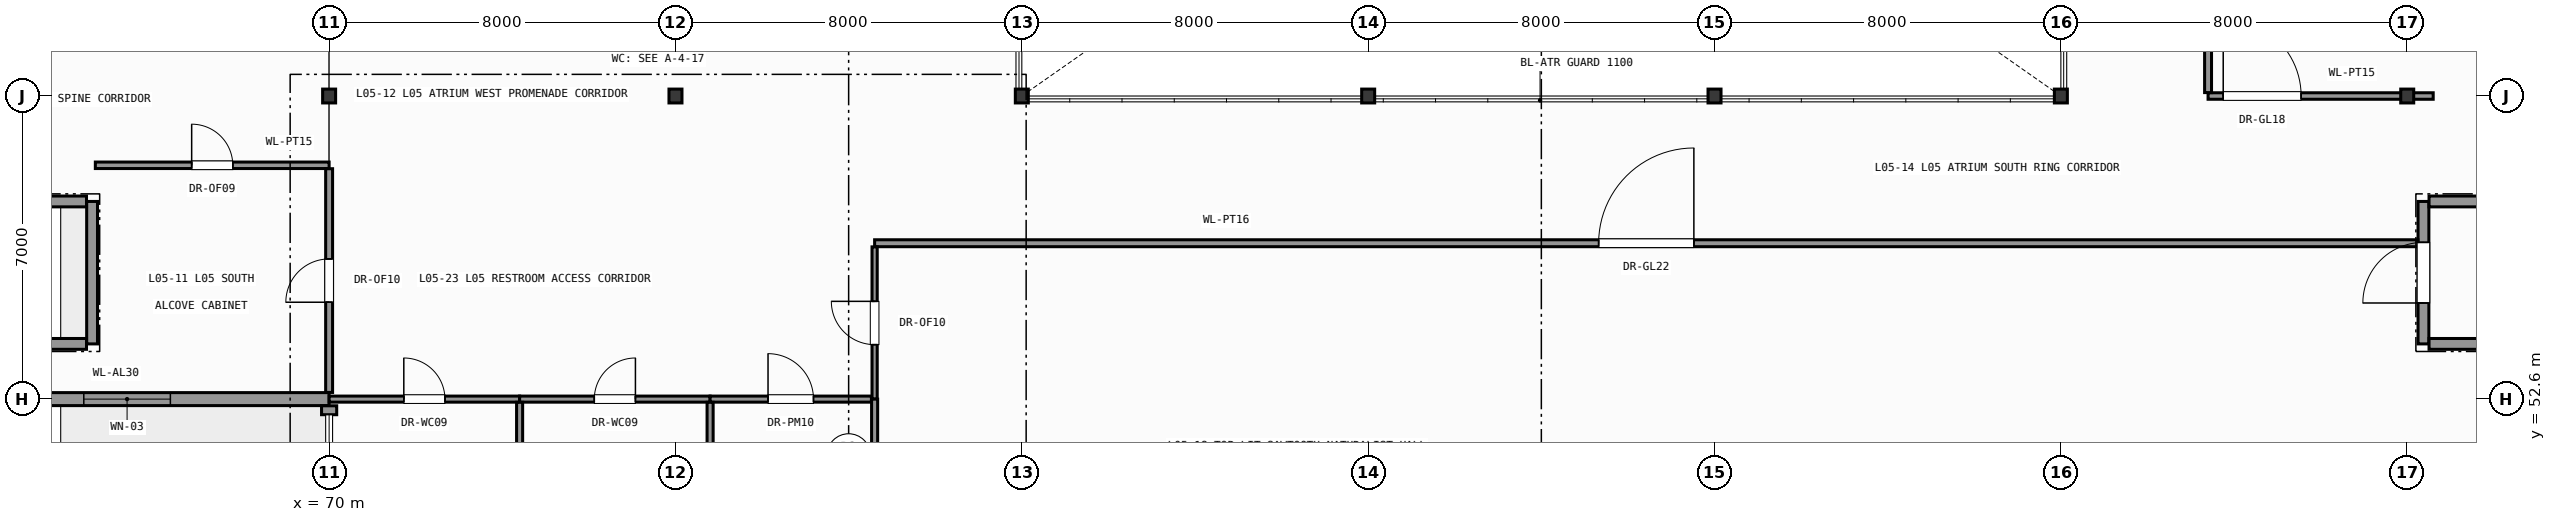
"""IFC4 building model, lengths in metres.
Left out: names, types, materials, properties, quantities, classifications, styles, units other than length and angle.
Written with IfcOpenShell. Run it as: python <this file> out.ifc"""

import sys

from ifc_helpers import new_model, si_unit, direction, frame, frame_2d, origin, origin_2d, place, context, subcontext, project, spatial, rectangle, i_section, extrude, element, fill, save


model = new_model("IFC4")
c1 = context("Model", 3, precision=1e-05, world=origin(), true_north=direction((0.0, 1.0)))
c2 = subcontext(c1, "Body", "Model", "MODEL_VIEW")
j1 = project(units=[si_unit("LENGTHUNIT", "METRE"), si_unit("PLANEANGLEUNIT", "RADIAN")], contexts=[c1])
p1 = place(None, origin())
s1 = spatial("IfcSite", under=j1, at=p1, CompositionType="ELEMENT")
p2 = place(p1, origin())
s2 = spatial("IfcBuilding", under=s1, at=p2, CompositionType="ELEMENT")
p3 = place(p2, frame((0.0, 0.0, 22.2)))
s3 = spatial("IfcBuildingStorey", under=s2, at=p3, CompositionType="ELEMENT", Elevation=22.2)
for number, where, z_axis, x_axis in (
    (1, (70.0, 59.6, 0.0), (0.0, 0.0, 1.0), (1.0, 0.0, 0.0)),
    (2, (78.0, 59.6, 0.0), (0.0, 0.0, 1.0), (1.0, 0.0, 0.0)),
    (3, (86.0, 59.6, 0.0), (0.0, 0.0, 1.0), (1.0, 0.0, 0.0)),
    (4, (94.0, 59.6, 0.0), (0.0, 0.0, 1.0), (1.0, 0.0, 0.0)),
    (5, (102.0, 59.6, 0.0), (0.0, 0.0, 1.0), (1.0, 0.0, 0.0)),
    (6, (110.0, 59.6, 0.0), (0.0, 0.0, 1.0), (1.0, 0.0, 0.0)),
    (7, (118.0, 59.6, 0.0), (0.0, 0.0, 1.0), (1.0, 0.0, 0.0)),
):
    element("IfcColumn", number, at=place(p3, frame(where, z_axis=z_axis, x_axis=x_axis)), inside=s3, PredefinedType="COLUMN", context=c2, shape_type="SweptSolid", body=[
        extrude(i_section(OverallWidth=0.3, OverallDepth=0.32, WebThickness=0.011, FlangeThickness=0.021, FilletRadius=0.027, at=origin_2d()), origin(), (0.0, 0.0, 1.0), 4.2),
    ])
p4 = place(p3, frame((70.0, 52.6, 0.0), z_axis=(0.0, 0.0, 1.0), x_axis=(-1.0, 0.0, 0.0)))
e8 = element("IfcWall", 8, at=p4, inside=s3, PredefinedType="SOLIDWALL", context=c2, shape_type="SweptSolid", body=[
    extrude(rectangle(XDim=14.0, YDim=0.3, at=frame_2d((7.0, 0.0))), origin(), (0.0, 0.0, 1.0), 3.98),
])
p5 = place(p4, frame((3.667, 0.0, 0.95)))
e9 = element("IfcOpeningElement", 9, at=p5, cuts=e8, PredefinedType="OPENING", context=c2, shape_type="SweptSolid", body=[
    extrude(rectangle(XDim=2.0, YDim=2.63, at=frame_2d((1.0, 1.315))), frame((0.0, 0.16, 0.0), z_axis=(0.0, -1.0, 0.0), x_axis=(1.0, 0.0, 0.0)), (0.0, 0.0, 1.0), 0.32),
])
p6 = place(p4, frame((8.333, 0.0, 0.95)))
e10 = element("IfcOpeningElement", 10, at=p6, cuts=e8, PredefinedType="OPENING", context=c2, shape_type="SweptSolid", body=[
    extrude(rectangle(XDim=2.0, YDim=2.63, at=frame_2d((1.0, 1.315))), frame((0.0, 0.16, 0.0), z_axis=(0.0, -1.0, 0.0), x_axis=(1.0, 0.0, 0.0)), (0.0, 0.0, 1.0), 0.32),
])
p7 = place(p3, frame((70.0, 52.446, 0.0), z_axis=(0.0, 0.0, 1.0), x_axis=(0.0, -1.0, 0.0)))
e11 = element("IfcWall", 11, at=p7, inside=s3, PredefinedType="SOLIDWALL", context=c2, shape_type="SweptSolid", body=[
    extrude(rectangle(XDim=0.206, YDim=0.35, at=frame_2d((0.103, 0.0))), origin(), (0.0, 0.0, 1.0), 3.98),
])
p8 = place(p3, frame((64.525, 53.875, 0.0), z_axis=(0.0, 0.0, 1.0), x_axis=(0.0, 1.0, 0.0)))
e12 = element("IfcWall", 12, at=p8, inside=s3, PredefinedType="SHEAR", context=c2, shape_type="SweptSolid", body=[
    extrude(rectangle(XDim=3.29, YDim=0.25, at=frame_2d((1.645, 0.0))), origin(), (0.0, 0.0, 1.0), 3.98),
])
for number, where, z_axis, x_axis in (
    (13, (57.204, 53.875, 0.0), (0.0, 0.0, 1.0), (1.0, 0.0, 0.0)),
    (14, (57.204, 57.165, 0.0), (0.0, 0.0, 1.0), (1.0, 0.0, 0.0)),
):
    element("IfcWall", number, at=place(p3, frame(where, z_axis=z_axis, x_axis=x_axis)), inside=s3, PredefinedType="SHEAR", context=c2, shape_type="SweptSolid", body=[
        extrude(rectangle(XDim=7.192, YDim=0.25, at=frame_2d((3.596, 0.0))), origin(), (0.0, 0.0, 1.0), 3.98),
    ])
p9 = place(p3, frame((118.375, 53.875, 0.0), z_axis=(0.0, 0.0, 1.0), x_axis=(0.0, 1.0, 0.0)))
e15 = element("IfcWall", 15, at=p9, inside=s3, PredefinedType="SHEAR", context=c2, shape_type="SweptSolid", body=[
    extrude(rectangle(XDim=3.29, YDim=0.25, at=frame_2d((1.645, 0.0))), origin(), (0.0, 0.0, 1.0), 3.98),
])
p10 = place(p9, frame((0.945, 0.0, 0.0)))
e16 = element("IfcOpeningElement", 16, at=p10, cuts=e15, PredefinedType="OPENING", context=c2, shape_type="SweptSolid", body=[
    extrude(rectangle(XDim=1.4, YDim=2.2, at=frame_2d((0.7, 1.1))), frame((0.0, 0.135, 0.0), z_axis=(0.0, -1.0, 0.0), x_axis=(1.0, 0.0, 0.0)), (0.0, 0.0, 1.0), 0.27),
])
for number, where, z_axis, x_axis in (
    (17, (118.504, 53.875, 0.0), (0.0, 0.0, 1.0), (1.0, 0.0, 0.0)),
    (18, (118.504, 57.165, 0.0), (0.0, 0.0, 1.0), (1.0, 0.0, 0.0)),
):
    element("IfcWall", number, at=place(p3, frame(where, z_axis=z_axis, x_axis=x_axis)), inside=s3, PredefinedType="SHEAR", context=c2, shape_type="SweptSolid", body=[
        extrude(rectangle(XDim=6.892, YDim=0.25, at=frame_2d((3.446, 0.0))), origin(), (0.0, 0.0, 1.0), 3.98),
    ])
p11 = place(p3, frame((64.6, 58.0, 0.0), z_axis=(0.0, 0.0, 1.0), x_axis=(1.0, 0.0, 0.0)))
e19 = element("IfcWall", 19, at=p11, inside=s3, PredefinedType="PARTITIONING", context=c2, shape_type="SweptSolid", body=[
    extrude(rectangle(XDim=5.4, YDim=0.15, at=frame_2d((2.7, 0.0))), origin(), (0.0, 0.0, 1.0), 3.98),
])
p12 = place(p11, frame((2.225, 0.0, 0.0)))
e20 = element("IfcOpeningElement", 20, at=p12, cuts=e19, PredefinedType="OPENING", context=c2, shape_type="SweptSolid", body=[
    extrude(rectangle(XDim=0.95, YDim=2.1, at=frame_2d((0.475, 1.05))), frame((0.0, 0.085, 0.0), z_axis=(0.0, -1.0, 0.0), x_axis=(1.0, 0.0, 0.0)), (0.0, 0.0, 1.0), 0.17),
])
p13 = place(p3, frame((70.0, 52.754, 0.0), z_axis=(0.0, 0.0, 1.0), x_axis=(0.0, 1.0, 0.0)))
e21 = element("IfcWall", 21, at=p13, inside=s3, PredefinedType="PARTITIONING", context=c2, shape_type="SweptSolid", body=[
    extrude(rectangle(XDim=5.167, YDim=0.16, at=frame_2d((2.583, 0.0))), origin(), (0.0, 0.0, 1.0), 3.98),
])
p14 = place(p13, frame((2.083, 0.0, 0.0)))
e22 = element("IfcOpeningElement", 22, at=p14, cuts=e21, PredefinedType="OPENING", context=c2, shape_type="SweptSolid", body=[
    extrude(rectangle(XDim=1.0, YDim=2.15, at=frame_2d((0.5, 1.075))), frame((0.0, 0.09, 0.0), z_axis=(0.0, -1.0, 0.0), x_axis=(1.0, 0.0, 0.0)), (0.0, 0.0, 1.0), 0.18),
])
p15 = place(p3, frame((82.6, 56.2, 0.0), z_axis=(0.0, 0.0, 1.0), x_axis=(1.0, 0.0, 0.0)))
e23 = element("IfcWall", 23, at=p15, inside=s3, PredefinedType="PARTITIONING", context=c2, shape_type="SweptSolid", body=[
    extrude(rectangle(XDim=35.646, YDim=0.16, at=frame_2d((17.823, 0.0))), origin(), (0.0, 0.0, 1.0), 3.98),
])
p16 = place(p15, frame((16.723, 0.0, 0.0)))
e24 = element("IfcOpeningElement", 24, at=p16, cuts=e23, PredefinedType="OPENING", context=c2, shape_type="SweptSolid", body=[
    extrude(rectangle(XDim=2.2, YDim=2.6, at=frame_2d((1.1, 1.3))), frame((0.0, 0.09, 0.0), z_axis=(0.0, -1.0, 0.0), x_axis=(1.0, 0.0, 0.0)), (0.0, 0.0, 1.0), 0.18),
])
p17 = place(p3, frame((113.4, 59.6, 0.0), z_axis=(0.0, 0.0, 1.0), x_axis=(1.0, 0.0, 0.0)))
e25 = element("IfcWall", 25, at=p17, inside=s3, PredefinedType="PARTITIONING", context=c2, shape_type="SweptSolid", body=[
    extrude(rectangle(XDim=5.2, YDim=0.15, at=frame_2d((2.6, 0.0))), origin(), (0.0, 0.0, 1.0), 3.335),
])
p18 = place(p17, frame((0.35, 0.0, 0.0)))
e26 = element("IfcOpeningElement", 26, at=p18, cuts=e25, PredefinedType="OPENING", context=c2, shape_type="SweptSolid", body=[
    extrude(rectangle(XDim=1.8, YDim=2.4, at=frame_2d((0.9, 1.2))), frame((0.0, 0.085, 0.0), z_axis=(0.0, -1.0, 0.0), x_axis=(1.0, 0.0, 0.0)), (0.0, 0.0, 1.0), 0.17),
])
p19 = place(p3, frame((113.4, 59.679, 0.0), z_axis=(0.0, 0.0, 1.0), x_axis=(0.0, 1.0, 0.0)))
e27 = element("IfcWall", 27, at=p19, inside=s3, PredefinedType="PARTITIONING", context=c2, shape_type="SweptSolid", body=[
    extrude(rectangle(XDim=8.321, YDim=0.16, at=frame_2d((4.161, 0.0))), origin(), (0.0, 0.0, 1.0), 3.98),
])
p20 = place(p19, frame((3.061, 0.0, 0.0)))
e28 = element("IfcOpeningElement", 28, at=p20, cuts=e27, PredefinedType="OPENING", context=c2, shape_type="SweptSolid", body=[
    extrude(rectangle(XDim=2.2, YDim=2.6, at=frame_2d((1.1, 1.3))), frame((0.0, 0.09, 0.0), z_axis=(0.0, -1.0, 0.0), x_axis=(1.0, 0.0, 0.0)), (0.0, 0.0, 1.0), 0.18),
])
p21 = place(p3, frame((82.6, 52.6, 0.0), z_axis=(0.0, 0.0, 1.0), x_axis=(0.0, 1.0, 0.0)))
e29 = element("IfcWall", 29, at=p21, inside=s3, PredefinedType="PARTITIONING", context=c2, shape_type="SweptSolid", body=[
    extrude(rectangle(XDim=3.516, YDim=0.12, at=frame_2d((1.758, 0.0))), origin(), (0.0, 0.0, 1.0), 3.98),
])
p22 = place(p21, frame((1.258, 0.0, 0.0)))
e30 = element("IfcOpeningElement", 30, at=p22, cuts=e29, PredefinedType="OPENING", context=c2, shape_type="SweptSolid", body=[
    extrude(rectangle(XDim=1.0, YDim=2.15, at=frame_2d((0.5, 1.075))), frame((0.0, 0.07, 0.0), z_axis=(0.0, -1.0, 0.0), x_axis=(1.0, 0.0, 0.0)), (0.0, 0.0, 1.0), 0.14),
])
p23 = place(p3, frame((82.6, 45.6, 0.0), z_axis=(0.0, 0.0, 1.0), x_axis=(0.0, 1.0, 0.0)))
e31 = element("IfcWall", 31, at=p23, inside=s3, PredefinedType="PARTITIONING", context=c2, shape_type="SweptSolid", body=[
    extrude(rectangle(XDim=7.0, YDim=0.14, at=frame_2d((3.5, 0.0))), origin(), (0.0, 0.0, 1.0), 3.98),
])
p24 = place(p23, frame((2.975, 0.0, 0.0)))
e32 = element("IfcOpeningElement", 32, at=p24, cuts=e31, PredefinedType="OPENING", context=c2, shape_type="SweptSolid", body=[
    extrude(rectangle(XDim=1.05, YDim=2.15, at=frame_2d((0.525, 1.075))), frame((0.0, 0.08, 0.0), z_axis=(0.0, -1.0, 0.0), x_axis=(1.0, 0.0, 0.0)), (0.0, 0.0, 1.0), 0.16),
])
p25 = place(p3, frame((70.0, 52.6, 0.0), z_axis=(0.0, 0.0, 1.0), x_axis=(1.0, 0.0, 0.0)))
e33 = element("IfcWall", 33, at=p25, inside=s3, PredefinedType="PARTITIONING", context=c2, shape_type="SweptSolid", body=[
    extrude(rectangle(XDim=4.4, YDim=0.14, at=frame_2d((2.2, 0.0))), origin(), (0.0, 0.0, 1.0), 3.98),
])
p26 = place(p25, frame((1.725, 0.0, 0.0)))
e34 = element("IfcOpeningElement", 34, at=p26, cuts=e33, PredefinedType="OPENING", context=c2, shape_type="SweptSolid", body=[
    extrude(rectangle(XDim=0.95, YDim=2.1, at=frame_2d((0.475, 1.05))), frame((0.0, 0.08, 0.0), z_axis=(0.0, -1.0, 0.0), x_axis=(1.0, 0.0, 0.0)), (0.0, 0.0, 1.0), 0.16),
])
p27 = place(p3, frame((74.4, 52.6, 0.0), z_axis=(0.0, 0.0, 1.0), x_axis=(1.0, 0.0, 0.0)))
e35 = element("IfcWall", 35, at=p27, inside=s3, PredefinedType="PARTITIONING", context=c2, shape_type="SweptSolid", body=[
    extrude(rectangle(XDim=4.4, YDim=0.14, at=frame_2d((2.2, 0.0))), origin(), (0.0, 0.0, 1.0), 3.98),
])
p28 = place(p27, frame((1.725, 0.0, 0.0)))
e36 = element("IfcOpeningElement", 36, at=p28, cuts=e35, PredefinedType="OPENING", context=c2, shape_type="SweptSolid", body=[
    extrude(rectangle(XDim=0.95, YDim=2.1, at=frame_2d((0.475, 1.05))), frame((0.0, 0.08, 0.0), z_axis=(0.0, -1.0, 0.0), x_axis=(1.0, 0.0, 0.0)), (0.0, 0.0, 1.0), 0.16),
])
p29 = place(p3, frame((78.8, 52.6, 0.0), z_axis=(0.0, 0.0, 1.0), x_axis=(1.0, 0.0, 0.0)))
e37 = element("IfcWall", 37, at=p29, inside=s3, PredefinedType="PARTITIONING", context=c2, shape_type="SweptSolid", body=[
    extrude(rectangle(XDim=3.726, YDim=0.14, at=frame_2d((1.863, 0.0))), origin(), (0.0, 0.0, 1.0), 3.98),
])
p30 = place(p29, frame((1.338, 0.0, 0.0)))
e38 = element("IfcOpeningElement", 38, at=p30, cuts=e37, PredefinedType="OPENING", context=c2, shape_type="SweptSolid", body=[
    extrude(rectangle(XDim=1.05, YDim=2.15, at=frame_2d((0.525, 1.075))), frame((0.0, 0.08, 0.0), z_axis=(0.0, -1.0, 0.0), x_axis=(1.0, 0.0, 0.0)), (0.0, 0.0, 1.0), 0.16),
])
for number, where, z_axis, x_axis in (
    (39, (74.4, 45.6, 0.0), (0.0, 0.0, 1.0), (0.0, 1.0, 0.0)),
    (40, (78.8, 45.6, 0.0), (0.0, 0.0, 1.0), (0.0, 1.0, 0.0)),
):
    element("IfcWall", number, at=place(p3, frame(where, z_axis=z_axis, x_axis=x_axis)), inside=s3, PredefinedType="PARTITIONING", context=c2, shape_type="SweptSolid", body=[
        extrude(rectangle(XDim=6.926, YDim=0.14, at=frame_2d((3.463, 0.0))), origin(), (0.0, 0.0, 1.0), 3.98),
    ])
p31 = place(p5, origin())
e41 = element("IfcWindow", 41, at=p31, inside=s3, PartitioningType="SINGLE_PANEL", PredefinedType="WINDOW", context=c2, shape_type="SweptSolid", body=[
    extrude(rectangle(XDim=2.0, YDim=2.63, at=frame_2d((1.0, 1.315))), frame((0.0, 0.03, 0.0), z_axis=(0.0, -1.0, 0.0), x_axis=(1.0, 0.0, 0.0)), (0.0, 0.0, 1.0), 0.06),
])
fill(e9, e41)
p32 = place(p10, origin())
e42 = element("IfcDoor", 42, at=p32, inside=s3, OperationType="SINGLE_SWING_LEFT", PredefinedType="DOOR", context=c2, shape_type="SweptSolid", body=[
    extrude(rectangle(XDim=1.4, YDim=2.2, at=frame_2d((0.7, 1.1))), frame((0.0, 0.025, 0.0), z_axis=(0.0, -1.0, 0.0), x_axis=(1.0, 0.0, 0.0)), (0.0, 0.0, 1.0), 0.05),
])
fill(e16, e42)
p33 = place(p12, origin())
e43 = element("IfcDoor", 43, at=p33, inside=s3, OperationType="SINGLE_SWING_LEFT", PredefinedType="DOOR", context=c2, shape_type="SweptSolid", body=[
    extrude(rectangle(XDim=0.95, YDim=2.1, at=frame_2d((0.475, 1.05))), frame((0.0, 0.025, 0.0), z_axis=(0.0, -1.0, 0.0), x_axis=(1.0, 0.0, 0.0)), (0.0, 0.0, 1.0), 0.05),
])
fill(e20, e43)
p34 = place(p14, origin())
e44 = element("IfcDoor", 44, at=p34, inside=s3, OperationType="SINGLE_SWING_LEFT", PredefinedType="DOOR", context=c2, shape_type="SweptSolid", body=[
    extrude(rectangle(XDim=1.0, YDim=2.15, at=frame_2d((0.5, 1.075))), frame((0.0, 0.025, 0.0), z_axis=(0.0, -1.0, 0.0), x_axis=(1.0, 0.0, 0.0)), (0.0, 0.0, 1.0), 0.05),
])
fill(e22, e44)
p35 = place(p16, origin())
e45 = element("IfcDoor", 45, at=p35, inside=s3, OperationType="SINGLE_SWING_RIGHT", PredefinedType="DOOR", context=c2, shape_type="SweptSolid", body=[
    extrude(rectangle(XDim=2.2, YDim=2.6, at=frame_2d((1.1, 1.3))), frame((0.0, 0.025, 0.0), z_axis=(0.0, -1.0, 0.0), x_axis=(1.0, 0.0, 0.0)), (0.0, 0.0, 1.0), 0.05),
])
fill(e24, e45)
p36 = place(p18, origin())
e46 = element("IfcDoor", 46, at=p36, inside=s3, OperationType="SINGLE_SWING_LEFT", PredefinedType="DOOR", context=c2, shape_type="SweptSolid", body=[
    extrude(rectangle(XDim=1.8, YDim=2.4, at=frame_2d((0.9, 1.2))), frame((0.0, 0.025, 0.0), z_axis=(0.0, -1.0, 0.0), x_axis=(1.0, 0.0, 0.0)), (0.0, 0.0, 1.0), 0.05),
])
fill(e26, e46)
p37 = place(p22, origin())
e47 = element("IfcDoor", 47, at=p37, inside=s3, OperationType="SINGLE_SWING_RIGHT", PredefinedType="DOOR", context=c2, shape_type="SweptSolid", body=[
    extrude(rectangle(XDim=1.0, YDim=2.15, at=frame_2d((0.5, 1.075))), frame((0.0, 0.025, 0.0), z_axis=(0.0, -1.0, 0.0), x_axis=(1.0, 0.0, 0.0)), (0.0, 0.0, 1.0), 0.05),
])
fill(e30, e47)
p38 = place(p26, origin())
e48 = element("IfcDoor", 48, at=p38, inside=s3, OperationType="SINGLE_SWING_LEFT", PredefinedType="DOOR", context=c2, shape_type="SweptSolid", body=[
    extrude(rectangle(XDim=0.95, YDim=2.1, at=frame_2d((0.475, 1.05))), frame((0.0, 0.025, 0.0), z_axis=(0.0, -1.0, 0.0), x_axis=(1.0, 0.0, 0.0)), (0.0, 0.0, 1.0), 0.05),
])
fill(e34, e48)
p39 = place(p28, origin())
e49 = element("IfcDoor", 49, at=p39, inside=s3, OperationType="SINGLE_SWING_RIGHT", PredefinedType="DOOR", context=c2, shape_type="SweptSolid", body=[
    extrude(rectangle(XDim=0.95, YDim=2.1, at=frame_2d((0.475, 1.05))), frame((0.0, 0.025, 0.0), z_axis=(0.0, -1.0, 0.0), x_axis=(1.0, 0.0, 0.0)), (0.0, 0.0, 1.0), 0.05),
])
fill(e36, e49)
p40 = place(p30, origin())
e50 = element("IfcDoor", 50, at=p40, inside=s3, OperationType="SINGLE_SWING_LEFT", PredefinedType="DOOR", context=c2, shape_type="SweptSolid", body=[
    extrude(rectangle(XDim=1.05, YDim=2.15, at=frame_2d((0.525, 1.075))), frame((0.0, 0.025, 0.0), z_axis=(0.0, -1.0, 0.0), x_axis=(1.0, 0.0, 0.0)), (0.0, 0.0, 1.0), 0.05),
])
fill(e38, e50)
save(model, sys.argv[1])
